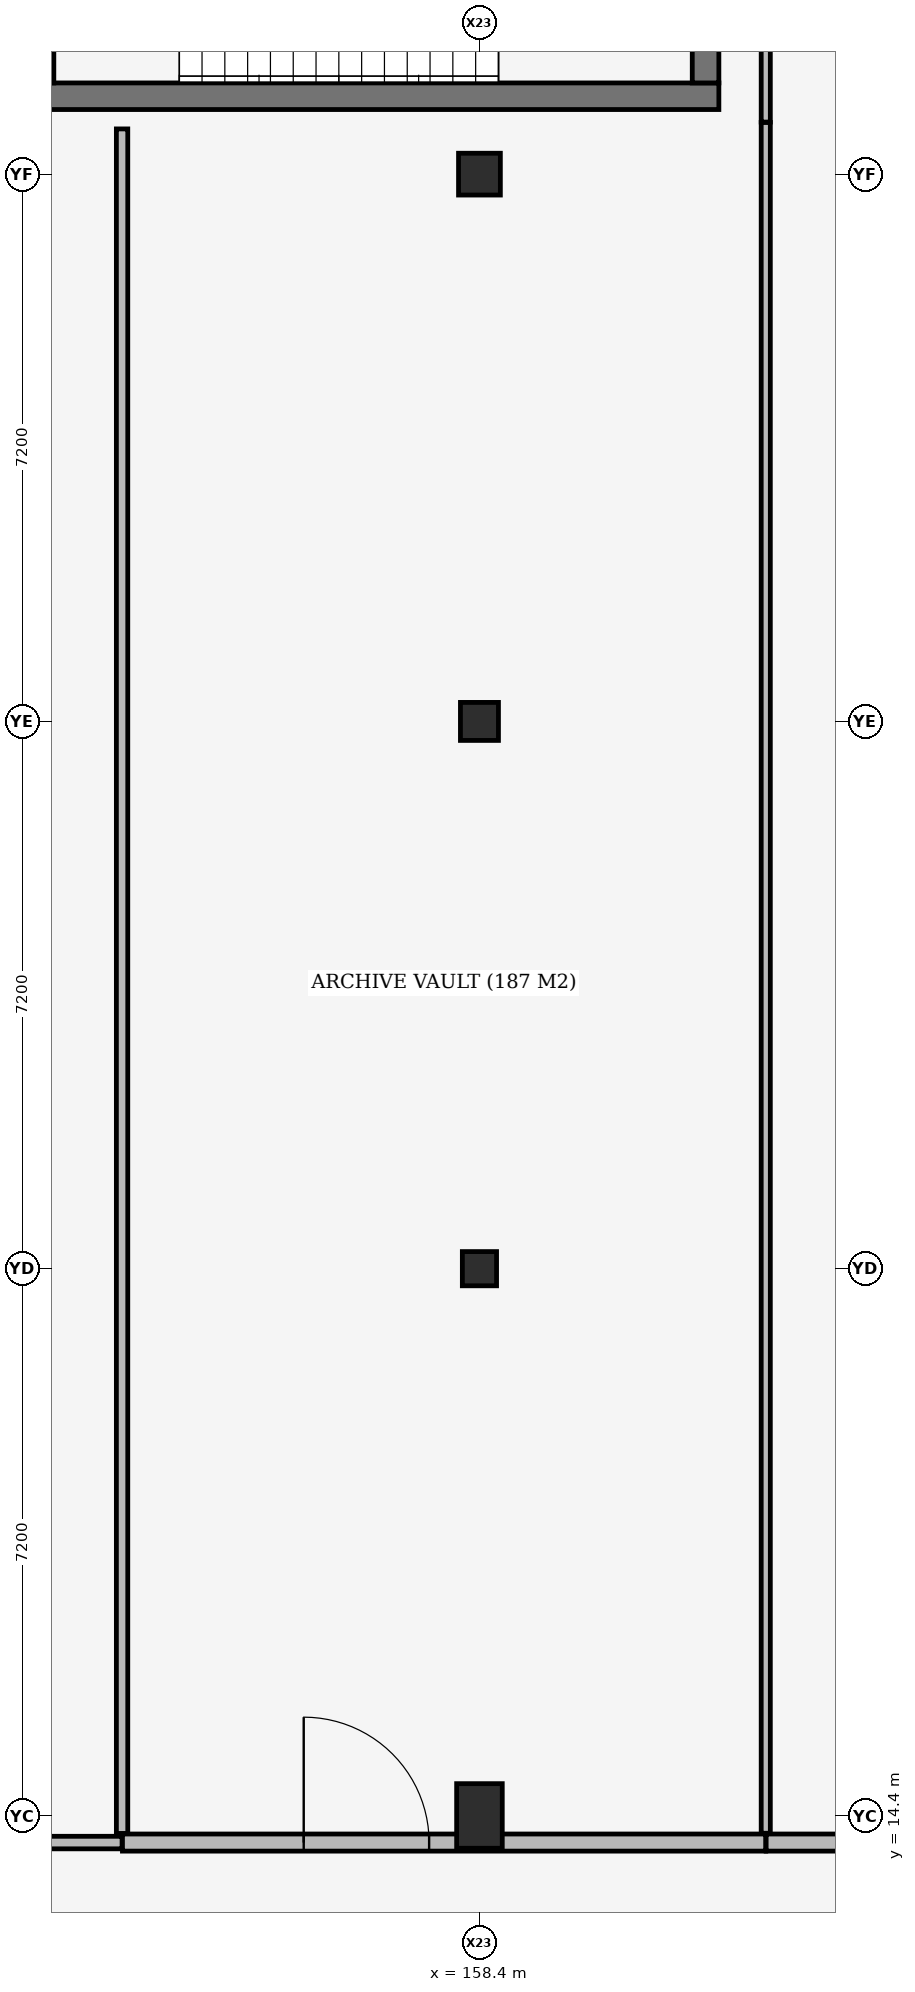
"""IFC4 building model, lengths in metres.
Left out: names, types, materials, properties, quantities, classifications, styles, units other than length and angle.
Written with IfcOpenShell. Run it as: python <this file> out.ifc"""

import sys

from ifc_helpers import new_model, si_unit, direction, frame, frame_2d, origin, origin_2d, place, context, subcontext, project, spatial, rectangle, extrude, element, fill, save


model = new_model("IFC4")
c1 = context("Model", 3, precision=1e-05, world=origin(), true_north=direction((0.0, 1.0)))
c2 = subcontext(c1, "Body", "Model", "MODEL_VIEW")
j1 = project(units=[si_unit("LENGTHUNIT", "METRE"), si_unit("PLANEANGLEUNIT", "RADIAN")], contexts=[c1])
p1 = place(None, origin())
s1 = spatial("IfcSite", under=j1, at=p1, CompositionType="ELEMENT")
p2 = place(p1, origin())
s2 = spatial("IfcBuilding", under=s1, at=p2, CompositionType="ELEMENT")
p3 = place(p2, frame((0.0, 0.0, -4.5)))
s3 = spatial("IfcBuildingStorey", under=s2, at=p3, CompositionType="ELEMENT", Elevation=-4.5)
p4 = place(p3, frame((158.4, 14.4, -0.42), z_axis=(0.0, 0.0, 1.0), x_axis=(1.0, 0.0, 0.0)))
e1 = element("IfcColumn", 1, at=p4, inside=s3, PredefinedType="COLUMN", context=c2, shape_type="SweptSolid", body=[
    extrude(rectangle(XDim=0.6, YDim=0.85, at=origin_2d()), origin(), (0.0, 0.0, 1.0), 4.6),
])
p5 = place(p3, frame((158.4, 21.6, -0.42), z_axis=(0.0, 0.0, 1.0), x_axis=(1.0, 0.0, 0.0)))
e2 = element("IfcColumn", 2, at=p5, inside=s3, PredefinedType="COLUMN", context=c2, shape_type="SweptSolid", body=[
    extrude(rectangle(XDim=0.45, YDim=0.45, at=origin_2d()), origin(), (0.0, 0.0, 1.0), 4.68),
])
p6 = place(p3, frame((158.4, 28.8, -0.42), z_axis=(0.0, 0.0, 1.0), x_axis=(1.0, 0.0, 0.0)))
e3 = element("IfcColumn", 3, at=p6, inside=s3, PredefinedType="COLUMN", context=c2, shape_type="SweptSolid", body=[
    extrude(rectangle(XDim=0.5, YDim=0.5, at=origin_2d()), origin(), (0.0, 0.0, 1.0), 4.68),
])
p7 = place(p3, frame((158.4, 36.0, -0.42), z_axis=(0.0, 0.0, 1.0), x_axis=(1.0, 0.0, 0.0)))
e4 = element("IfcColumn", 4, at=p7, inside=s3, PredefinedType="COLUMN", context=c2, shape_type="SweptSolid", body=[
    extrude(rectangle(XDim=0.55, YDim=0.55, at=origin_2d()), origin(), (0.0, 0.0, 1.0), 4.6),
])
p8 = place(p3, frame((152.45, 37.025, 0.0), z_axis=(0.0, 0.0, 1.0), x_axis=(1.0, 0.0, 0.0)))
e5 = element("IfcWall", 5, at=p8, inside=s3, PredefinedType="SHEAR", context=c2, shape_type="SweptSolid", body=[
    extrude(rectangle(XDim=9.1, YDim=0.35, at=frame_2d((4.55, 0.0))), origin(), (0.0, 0.0, 1.0), 4.18),
])
p9 = place(p3, frame((161.375, 37.2, 0.0), z_axis=(0.0, 0.0, 1.0), x_axis=(0.0, 1.0, 0.0)))
e6 = element("IfcWall", 6, at=p9, inside=s3, PredefinedType="SHEAR", context=c2, shape_type="SweptSolid", body=[
    extrude(rectangle(XDim=3.45, YDim=0.35, at=frame_2d((1.725, 0.0))), origin(), (0.0, 0.0, 1.0), 4.18),
])
p10 = place(p3, frame((152.625, 40.65, 0.0), z_axis=(0.0, 0.0, 1.0), x_axis=(0.0, -1.0, 0.0)))
e7 = element("IfcWall", 7, at=p10, inside=s3, PredefinedType="SHEAR", context=c2, shape_type="SweptSolid", body=[
    extrude(rectangle(XDim=3.45, YDim=0.35, at=frame_2d((1.725, 0.0))), origin(), (0.0, 0.0, 1.0), 4.18),
])
p11 = place(p10, frame((1.035, 0.0, 0.0)))
e8 = element("IfcOpeningElement", 8, at=p11, cuts=e7, PredefinedType="OPENING", context=c2, shape_type="SweptSolid", body=[
    extrude(rectangle(XDim=1.38, YDim=2.2, at=frame_2d((0.69, 1.1))), frame((0.0, 0.185, 0.0), z_axis=(0.0, -1.0, 0.0), x_axis=(1.0, 0.0, 0.0)), (0.0, 0.0, 1.0), 0.37),
])
p12 = place(p3, frame((141.507, 14.05, 0.0), z_axis=(0.0, 0.0, 1.0), x_axis=(1.0, 0.0, 0.0)))
e9 = element("IfcWall", 9, at=p12, inside=s3, PredefinedType="PARTITIONING", context=c2, shape_type="SweptSolid", body=[
    extrude(rectangle(XDim=12.191, YDim=0.165, at=frame_2d((6.095, 0.0))), origin(), (0.0, 0.0, 1.0), 3.58),
])
p13 = place(p12, frame((5.571, 0.0, 0.0)))
e10 = element("IfcOpeningElement", 10, at=p13, cuts=e9, PredefinedType="OPENING", context=c2, shape_type="SweptSolid", body=[
    extrude(rectangle(XDim=1.05, YDim=2.2, at=frame_2d((0.525, 1.1))), frame((0.0, 0.093, 0.0), z_axis=(0.0, -1.0, 0.0), x_axis=(1.0, 0.0, 0.0)), (0.0, 0.0, 1.0), 0.185),
])
p14 = place(p3, frame((153.698, 14.17, 0.0), z_axis=(0.0, 0.0, 1.0), x_axis=(0.0, 1.0, 0.0)))
e11 = element("IfcWall", 11, at=p14, inside=s3, PredefinedType="PARTITIONING", context=c2, shape_type="SweptSolid", body=[
    extrude(rectangle(XDim=22.425, YDim=0.15, at=frame_2d((11.212, 0.0))), origin(), (0.0, 0.0, 1.0), 3.38),
])
p15 = place(p3, frame((153.703, 14.05, 0.0), z_axis=(0.0, 0.0, 1.0), x_axis=(1.0, 0.0, 0.0)))
e12 = element("IfcWall", 12, at=p15, inside=s3, PredefinedType="STANDARD", context=c2, shape_type="SweptSolid", body=[
    extrude(rectangle(XDim=8.464, YDim=0.225, at=frame_2d((4.232, 0.0))), origin(), (0.0, 0.0, 1.0), 3.48),
])
p16 = place(p15, frame((2.385, 0.0, 0.0)))
e13 = element("IfcOpeningElement", 13, at=p16, cuts=e12, PredefinedType="OPENING", context=c2, shape_type="SweptSolid", body=[
    extrude(rectangle(XDim=1.65, YDim=2.25, at=frame_2d((0.825, 1.125))), frame((0.0, 0.123, 0.0), z_axis=(0.0, -1.0, 0.0), x_axis=(1.0, 0.0, 0.0)), (0.0, 0.0, 1.0), 0.245),
])
p17 = place(p3, frame((162.167, 14.173, 0.0), z_axis=(0.0, 0.0, 1.0), x_axis=(0.0, 1.0, 0.0)))
e14 = element("IfcWall", 14, at=p17, inside=s3, PredefinedType="PARTITIONING", context=c2, shape_type="SweptSolid", body=[
    extrude(rectangle(XDim=22.507, YDim=0.12, at=frame_2d((11.254, 0.0))), origin(), (0.0, 0.0, 1.0), 3.38),
])
p18 = place(p3, frame((162.172, 14.05, 0.0), z_axis=(0.0, 0.0, 1.0), x_axis=(1.0, 0.0, 0.0)))
e15 = element("IfcWall", 15, at=p18, inside=s3, PredefinedType="STANDARD", context=c2, shape_type="SweptSolid", body=[
    extrude(rectangle(XDim=10.328, YDim=0.225, at=frame_2d((5.164, 0.0))), origin(), (0.0, 0.0, 1.0), 3.38),
])
p19 = place(p18, frame((4.339, 0.0, 0.0)))
e16 = element("IfcOpeningElement", 16, at=p19, cuts=e15, PredefinedType="OPENING", context=c2, shape_type="SweptSolid", body=[
    extrude(rectangle(XDim=1.65, YDim=2.25, at=frame_2d((0.825, 1.125))), frame((0.0, 0.123, 0.0), z_axis=(0.0, -1.0, 0.0), x_axis=(1.0, 0.0, 0.0)), (0.0, 0.0, 1.0), 0.245),
])
p20 = place(p3, frame((162.167, 36.685, 0.0), z_axis=(0.0, 0.0, 1.0), x_axis=(0.0, 1.0, 0.0)))
e17 = element("IfcWall", 17, at=p20, inside=s3, PredefinedType="PARTITIONING", context=c2, shape_type="SweptSolid", body=[
    extrude(rectangle(XDim=6.265, YDim=0.12, at=frame_2d((3.132, 0.0))), origin(), (0.0, 0.0, 1.0), 4.18),
])
p21 = place(p16, origin())
e18 = element("IfcDoor", 18, at=p21, inside=s3, OperationType="DOUBLE_DOOR_SINGLE_SWING", PredefinedType="DOOR", context=c2, shape_type="SweptSolid", body=[
    extrude(rectangle(XDim=1.65, YDim=2.25, at=frame_2d((0.825, 1.125))), frame((0.0, 0.025, 0.0), z_axis=(0.0, -1.0, 0.0), x_axis=(1.0, 0.0, 0.0)), (0.0, 0.0, 1.0), 0.05),
])
fill(e13, e18)
save(model, sys.argv[1])
